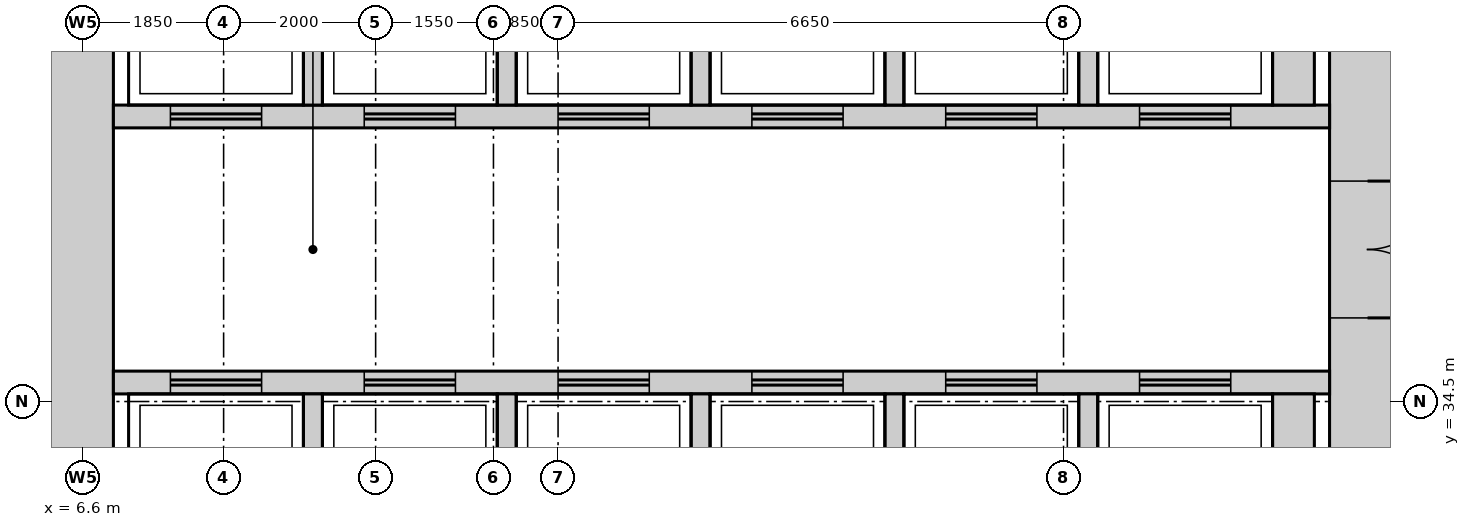
"""IFC4 building model, lengths in metres.
Left out: names, types, materials, properties, quantities, classifications, styles, units other than length and angle.
Written with IfcOpenShell. Run it as: python <this file> out.ifc"""

import sys

from ifc_helpers import new_model, si_unit, direction, frame, frame_2d, origin, place, context, subcontext, project, spatial, rectangle, extrude, source, transform, mapped, element, fill, save


model = new_model("IFC4")
c1 = context("Model", 3, precision=1e-05, world=origin(), true_north=direction((0.0, 1.0)))
c2 = subcontext(c1, "Body", "Model", "MODEL_VIEW")
j1 = project(units=[si_unit("LENGTHUNIT", "METRE"), si_unit("PLANEANGLEUNIT", "RADIAN")], contexts=[c1])
p1 = place(None, origin())
s1 = spatial("IfcSite", under=j1, at=p1, CompositionType="ELEMENT")
p2 = place(p1, origin())
s2 = spatial("IfcBuilding", under=s1, at=p2, CompositionType="ELEMENT")
p3 = place(p2, frame((0.0, 0.0, 158.7)))
s3 = spatial("IfcBuildingStorey", under=s2, at=p3, CompositionType="ELEMENT", Elevation=158.7)
m1 = source(origin(), c2, "Body", "SweptSolid", [
    extrude(rectangle(XDim=28.0, YDim=1.0, at=frame_2d((14.0, 0.0))), origin(), (0.0, 0.0, 1.0), 5.75),
])
p4 = place(p3, frame((23.5, 13.0, 0.0), z_axis=(0.0, 0.0, 1.0), x_axis=(0.0, 1.0, 0.0)))
e1 = element("IfcWall", 1, at=p4, inside=s3, PredefinedType="SHEAR", context=c2, shape_type="MappedRepresentation", body=[
    mapped(m1, transform((0.0, 0.0, 0.0))),
])
m2 = source(origin(), c2, "Body", "SweptSolid", [
    extrude(rectangle(XDim=1.8, YDim=2.1, at=frame_2d((0.9, 1.05))), frame((0.0, 0.51, 0.0), z_axis=(0.0, -1.0, 0.0), x_axis=(1.0, 0.0, 0.0)), (0.0, 0.0, 1.0), 1.02),
])
p5 = place(p4, frame((13.5, 0.0, 0.0)))
e2 = element("IfcOpeningElement", 2, at=p5, cuts=e1, PredefinedType="OPENING", context=c2, shape_type="MappedRepresentation", body=[
    mapped(m2, transform((0.0, 0.0, 0.0))),
])
p6 = place(p4, frame((22.6, 0.0, 0.0)))
e3 = element("IfcOpeningElement", 3, at=p6, cuts=e1, PredefinedType="OPENING", context=c2, shape_type="MappedRepresentation", body=[
    mapped(m2, transform((0.0, 0.0, 0.0))),
])
m3 = source(origin(), c2, "Body", "SweptSolid", [
    extrude(rectangle(XDim=0.9, YDim=2.1, at=frame_2d((0.45, 1.05))), frame((0.0, 0.51, 0.0), z_axis=(0.0, -1.0, 0.0), x_axis=(1.0, 0.0, 0.0)), (0.0, 0.0, 1.0), 1.02),
])
p7 = place(p4, frame((2.15, 0.0, 0.0)))
e4 = element("IfcOpeningElement", 4, at=p7, cuts=e1, PredefinedType="OPENING", context=c2, shape_type="MappedRepresentation", body=[
    mapped(m3, transform((0.0, 0.0, 0.0))),
])
p8 = place(p4, frame((7.0, 0.0, 0.0)))
e5 = element("IfcOpeningElement", 5, at=p8, cuts=e1, PredefinedType="OPENING", context=c2, shape_type="MappedRepresentation", body=[
    mapped(m3, transform((0.0, 0.0, 0.0))),
])
p9 = place(p3, frame((6.5, 13.0, 0.0), z_axis=(0.0, 0.0, 1.0), x_axis=(0.0, 1.0, 0.0)))
e6 = element("IfcWall", 6, at=p9, inside=s3, PredefinedType="SHEAR", context=c2, shape_type="MappedRepresentation", body=[
    mapped(m1, transform((0.0, 0.0, 0.0))),
])
m4 = source(origin(), c2, "Body", "SweptSolid", [
    extrude(rectangle(XDim=16.0, YDim=0.3, at=frame_2d((8.0, 0.0))), origin(), (0.0, 0.0, 1.0), 5.75),
])
p10 = place(p3, frame((7.0, 38.25, 0.0), z_axis=(0.0, 0.0, 1.0), x_axis=(1.0, 0.0, 0.0)))
e7 = element("IfcWall", 7, at=p10, inside=s3, PredefinedType="STANDARD", context=c2, shape_type="MappedRepresentation", body=[
    mapped(m4, transform((0.0, 0.0, 0.0))),
])
m5 = source(origin(), c2, "Body", "SweptSolid", [
    extrude(rectangle(XDim=1.2, YDim=2.1, at=frame_2d((0.6, 1.05))), frame((0.0, 0.16, 0.0), z_axis=(0.0, -1.0, 0.0), x_axis=(1.0, 0.0, 0.0)), (0.0, 0.0, 1.0), 0.32),
])
p11 = place(p10, frame((0.75, 0.0, 0.0)))
e8 = element("IfcOpeningElement", 8, at=p11, cuts=e7, PredefinedType="OPENING", context=c2, shape_type="MappedRepresentation", body=[
    mapped(m5, transform((0.0, 0.0, 0.0))),
])
p12 = place(p10, frame((3.3, 0.0, 0.0)))
e9 = element("IfcOpeningElement", 9, at=p12, cuts=e7, PredefinedType="OPENING", context=c2, shape_type="MappedRepresentation", body=[
    mapped(m5, transform((0.0, 0.0, 0.0))),
])
p13 = place(p10, frame((5.85, 0.0, 0.0)))
e10 = element("IfcOpeningElement", 10, at=p13, cuts=e7, PredefinedType="OPENING", context=c2, shape_type="MappedRepresentation", body=[
    mapped(m5, transform((0.0, 0.0, 0.0))),
])
p14 = place(p10, frame((8.4, 0.0, 0.0)))
e11 = element("IfcOpeningElement", 11, at=p14, cuts=e7, PredefinedType="OPENING", context=c2, shape_type="MappedRepresentation", body=[
    mapped(m5, transform((0.0, 0.0, 0.0))),
])
p15 = place(p10, frame((10.95, 0.0, 0.0)))
e12 = element("IfcOpeningElement", 12, at=p15, cuts=e7, PredefinedType="OPENING", context=c2, shape_type="MappedRepresentation", body=[
    mapped(m5, transform((0.0, 0.0, 0.0))),
])
p16 = place(p10, frame((13.5, 0.0, 0.0)))
e13 = element("IfcOpeningElement", 13, at=p16, cuts=e7, PredefinedType="OPENING", context=c2, shape_type="MappedRepresentation", body=[
    mapped(m5, transform((0.0, 0.0, 0.0))),
])
p17 = place(p3, frame((7.0, 34.75, 0.0), z_axis=(0.0, 0.0, 1.0), x_axis=(1.0, 0.0, 0.0)))
e14 = element("IfcWall", 14, at=p17, inside=s3, PredefinedType="STANDARD", context=c2, shape_type="MappedRepresentation", body=[
    mapped(m4, transform((0.0, 0.0, 0.0))),
])
p18 = place(p17, frame((0.75, 0.0, 0.0)))
e15 = element("IfcOpeningElement", 15, at=p18, cuts=e14, PredefinedType="OPENING", context=c2, shape_type="MappedRepresentation", body=[
    mapped(m5, transform((0.0, 0.0, 0.0))),
])
p19 = place(p17, frame((3.3, 0.0, 0.0)))
e16 = element("IfcOpeningElement", 16, at=p19, cuts=e14, PredefinedType="OPENING", context=c2, shape_type="MappedRepresentation", body=[
    mapped(m5, transform((0.0, 0.0, 0.0))),
])
p20 = place(p17, frame((5.85, 0.0, 0.0)))
e17 = element("IfcOpeningElement", 17, at=p20, cuts=e14, PredefinedType="OPENING", context=c2, shape_type="MappedRepresentation", body=[
    mapped(m5, transform((0.0, 0.0, 0.0))),
])
p21 = place(p17, frame((8.4, 0.0, 0.0)))
e18 = element("IfcOpeningElement", 18, at=p21, cuts=e14, PredefinedType="OPENING", context=c2, shape_type="MappedRepresentation", body=[
    mapped(m5, transform((0.0, 0.0, 0.0))),
])
p22 = place(p17, frame((10.95, 0.0, 0.0)))
e19 = element("IfcOpeningElement", 19, at=p22, cuts=e14, PredefinedType="OPENING", context=c2, shape_type="MappedRepresentation", body=[
    mapped(m5, transform((0.0, 0.0, 0.0))),
])
p23 = place(p17, frame((13.5, 0.0, 0.0)))
e20 = element("IfcOpeningElement", 20, at=p23, cuts=e14, PredefinedType="OPENING", context=c2, shape_type="MappedRepresentation", body=[
    mapped(m5, transform((0.0, 0.0, 0.0))),
])
m6 = source(origin(), c2, "Body", "SweptSolid", [
    extrude(rectangle(XDim=2.6, YDim=0.25, at=frame_2d((1.3, 0.0))), origin(), (0.0, 0.0, 1.0), 5.75),
])
for number, where, z_axis, x_axis in (
    (21, (9.625, 38.4, 0.0), (0.0, 0.0, 1.0), (0.0, 1.0, 0.0)),
    (22, (12.175, 38.4, 0.0), (0.0, 0.0, 1.0), (0.0, 1.0, 0.0)),
    (23, (14.725, 38.4, 0.0), (0.0, 0.0, 1.0), (0.0, 1.0, 0.0)),
    (24, (17.275, 38.4, 0.0), (0.0, 0.0, 1.0), (0.0, 1.0, 0.0)),
    (25, (19.825, 38.4, 0.0), (0.0, 0.0, 1.0), (0.0, 1.0, 0.0)),
):
    element("IfcWall", number, at=place(p3, frame(where, z_axis=z_axis, x_axis=x_axis)), inside=s3, PredefinedType="STANDARD", context=c2, shape_type="MappedRepresentation", body=[
        mapped(m6, transform((0.0, 0.0, 0.0))),
    ])
m7 = source(origin(), c2, "Body", "SweptSolid", [
    extrude(rectangle(XDim=2.6, YDim=0.55, at=frame_2d((1.3, 0.0))), origin(), (0.0, 0.0, 1.0), 5.75),
])
p24 = place(p3, frame((22.525, 38.4, 0.0), z_axis=(0.0, 0.0, 1.0), x_axis=(0.0, 1.0, 0.0)))
e26 = element("IfcWall", 26, at=p24, inside=s3, PredefinedType="STANDARD", context=c2, shape_type="MappedRepresentation", body=[
    mapped(m7, transform((0.0, 0.0, 0.0))),
])
m8 = source(origin(), c2, "Body", "SweptSolid", [
    extrude(rectangle(XDim=2.4, YDim=0.25, at=frame_2d((1.2, 0.0))), origin(), (0.0, 0.0, 1.0), 5.75),
])
for number, where, z_axis, x_axis in (
    (27, (9.625, 32.2, 0.0), (0.0, 0.0, 1.0), (0.0, 1.0, 0.0)),
    (28, (12.175, 32.2, 0.0), (0.0, 0.0, 1.0), (0.0, 1.0, 0.0)),
    (29, (14.725, 32.2, 0.0), (0.0, 0.0, 1.0), (0.0, 1.0, 0.0)),
    (30, (17.275, 32.2, 0.0), (0.0, 0.0, 1.0), (0.0, 1.0, 0.0)),
    (31, (19.825, 32.2, 0.0), (0.0, 0.0, 1.0), (0.0, 1.0, 0.0)),
):
    element("IfcWall", number, at=place(p3, frame(where, z_axis=z_axis, x_axis=x_axis)), inside=s3, PredefinedType="STANDARD", context=c2, shape_type="MappedRepresentation", body=[
        mapped(m8, transform((0.0, 0.0, 0.0))),
    ])
m9 = source(origin(), c2, "Body", "SweptSolid", [
    extrude(rectangle(XDim=2.4, YDim=0.55, at=frame_2d((1.2, 0.0))), origin(), (0.0, 0.0, 1.0), 5.75),
])
p25 = place(p3, frame((22.525, 32.2, 0.0), z_axis=(0.0, 0.0, 1.0), x_axis=(0.0, 1.0, 0.0)))
e32 = element("IfcWall", 32, at=p25, inside=s3, PredefinedType="STANDARD", context=c2, shape_type="MappedRepresentation", body=[
    mapped(m9, transform((0.0, 0.0, 0.0))),
])
m10 = source(origin(), c2, "Body", "SweptSolid", [
    extrude(rectangle(XDim=1.8, YDim=2.1, at=frame_2d((0.9, 1.05))), frame((0.0, 0.45, 0.0), z_axis=(0.0, -1.0, 0.0), x_axis=(1.0, 0.0, 0.0)), (0.0, 0.0, 1.0), 0.9),
])
p26 = place(p6, origin())
e33 = element("IfcDoor", 33, at=p26, inside=s3, OperationType="DOUBLE_DOOR_SINGLE_SWING", PredefinedType="DOOR", context=c2, shape_type="MappedRepresentation", body=[
    mapped(m10, transform((0.0, 0.0, 0.0))),
])
fill(e3, e33)
m11 = source(origin(), c2, "Body", "SweptSolid", [
    extrude(rectangle(XDim=1.2, YDim=2.1, at=frame_2d((0.6, 1.05))), frame((0.0, 0.025, 0.0), z_axis=(0.0, -1.0, 0.0), x_axis=(1.0, 0.0, 0.0)), (0.0, 0.0, 1.0), 0.05),
])
p27 = place(p18, origin())
e34 = element("IfcDoor", 34, at=p27, inside=s3, OperationType="DOUBLE_DOOR_SLIDING", PredefinedType="DOOR", context=c2, shape_type="MappedRepresentation", body=[
    mapped(m11, transform((0.0, 0.0, 0.0))),
])
fill(e15, e34)
p28 = place(p19, origin())
e35 = element("IfcDoor", 35, at=p28, inside=s3, OperationType="DOUBLE_DOOR_SLIDING", PredefinedType="DOOR", context=c2, shape_type="MappedRepresentation", body=[
    mapped(m11, transform((0.0, 0.0, 0.0))),
])
fill(e16, e35)
p29 = place(p20, origin())
e36 = element("IfcDoor", 36, at=p29, inside=s3, OperationType="DOUBLE_DOOR_SLIDING", PredefinedType="DOOR", context=c2, shape_type="MappedRepresentation", body=[
    mapped(m11, transform((0.0, 0.0, 0.0))),
])
fill(e17, e36)
p30 = place(p21, origin())
e37 = element("IfcDoor", 37, at=p30, inside=s3, OperationType="DOUBLE_DOOR_SLIDING", PredefinedType="DOOR", context=c2, shape_type="MappedRepresentation", body=[
    mapped(m11, transform((0.0, 0.0, 0.0))),
])
fill(e18, e37)
p31 = place(p22, origin())
e38 = element("IfcDoor", 38, at=p31, inside=s3, OperationType="DOUBLE_DOOR_SLIDING", PredefinedType="DOOR", context=c2, shape_type="MappedRepresentation", body=[
    mapped(m11, transform((0.0, 0.0, 0.0))),
])
fill(e19, e38)
p32 = place(p23, origin())
e39 = element("IfcDoor", 39, at=p32, inside=s3, OperationType="DOUBLE_DOOR_SLIDING", PredefinedType="DOOR", context=c2, shape_type="MappedRepresentation", body=[
    mapped(m11, transform((0.0, 0.0, 0.0))),
])
fill(e20, e39)
p33 = place(p11, origin())
e40 = element("IfcDoor", 40, at=p33, inside=s3, OperationType="DOUBLE_DOOR_SLIDING", PredefinedType="DOOR", context=c2, shape_type="MappedRepresentation", body=[
    mapped(m11, transform((0.0, 0.0, 0.0))),
])
fill(e8, e40)
p34 = place(p12, origin())
e41 = element("IfcDoor", 41, at=p34, inside=s3, OperationType="DOUBLE_DOOR_SLIDING", PredefinedType="DOOR", context=c2, shape_type="MappedRepresentation", body=[
    mapped(m11, transform((0.0, 0.0, 0.0))),
])
fill(e9, e41)
p35 = place(p13, origin())
e42 = element("IfcDoor", 42, at=p35, inside=s3, OperationType="DOUBLE_DOOR_SLIDING", PredefinedType="DOOR", context=c2, shape_type="MappedRepresentation", body=[
    mapped(m11, transform((0.0, 0.0, 0.0))),
])
fill(e10, e42)
p36 = place(p14, origin())
e43 = element("IfcDoor", 43, at=p36, inside=s3, OperationType="DOUBLE_DOOR_SLIDING", PredefinedType="DOOR", context=c2, shape_type="MappedRepresentation", body=[
    mapped(m11, transform((0.0, 0.0, 0.0))),
])
fill(e11, e43)
p37 = place(p15, origin())
e44 = element("IfcDoor", 44, at=p37, inside=s3, OperationType="DOUBLE_DOOR_SLIDING", PredefinedType="DOOR", context=c2, shape_type="MappedRepresentation", body=[
    mapped(m11, transform((0.0, 0.0, 0.0))),
])
fill(e12, e44)
p38 = place(p16, origin())
e45 = element("IfcDoor", 45, at=p38, inside=s3, OperationType="DOUBLE_DOOR_SLIDING", PredefinedType="DOOR", context=c2, shape_type="MappedRepresentation", body=[
    mapped(m11, transform((0.0, 0.0, 0.0))),
])
fill(e13, e45)
save(model, sys.argv[1])
